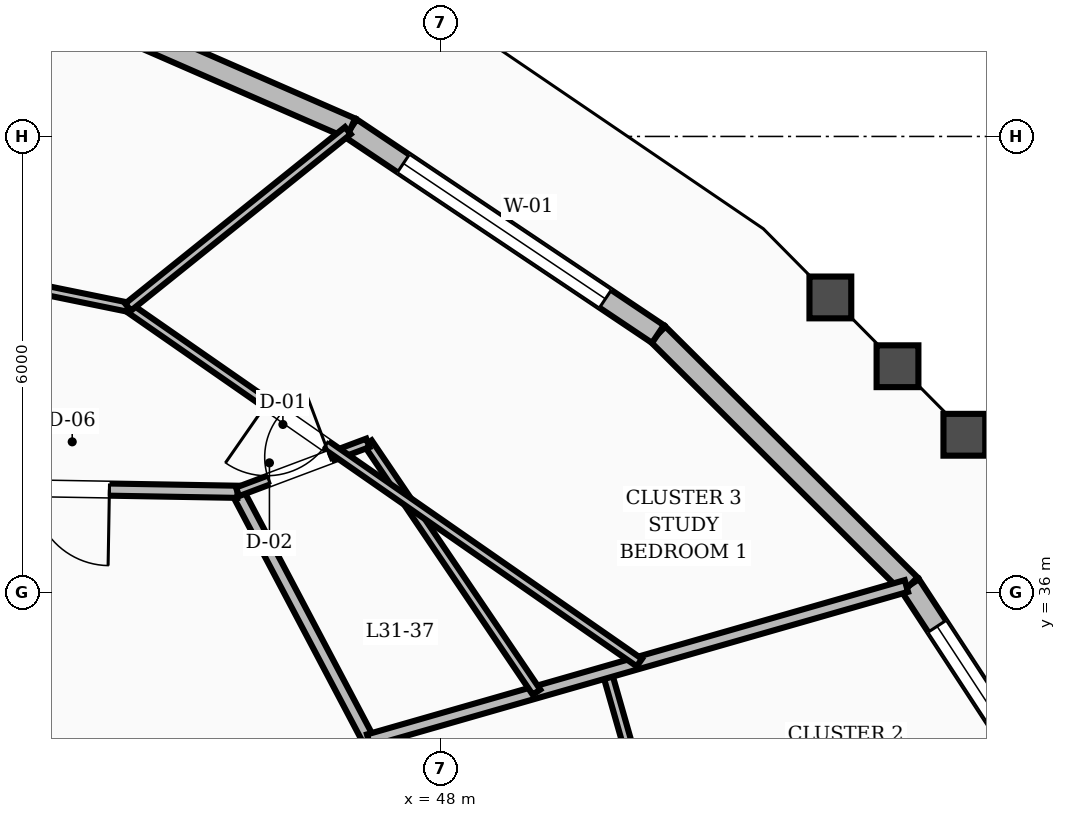
"""IFC4 building model, lengths in metres.
Left out: names, types, materials, properties, quantities, classifications, styles, units other than length and angle.
Written with IfcOpenShell. Run it as: python <this file> out.ifc"""

import sys

from ifc_helpers import new_model, si_unit, direction, frame, frame_2d, origin, place, context, subcontext, project, spatial, rectangle, extrude, element, fill, save


model = new_model("IFC4")
c1 = context("Model", 3, precision=1e-05, world=origin(), true_north=direction((0.0, 1.0)))
c2 = subcontext(c1, "Body", "Model", "MODEL_VIEW")
j1 = project(units=[si_unit("LENGTHUNIT", "METRE"), si_unit("PLANEANGLEUNIT", "RADIAN")], contexts=[c1])
p1 = place(None, origin())
s1 = spatial("IfcSite", under=j1, at=p1, CompositionType="ELEMENT")
p2 = place(p1, origin())
s2 = spatial("IfcBuilding", under=s1, at=p2, CompositionType="ELEMENT")
p3 = place(p2, frame((0.0, 0.0, 124.4)))
s3 = spatial("IfcBuildingStorey", under=s2, at=p3, CompositionType="ELEMENT", Elevation=124.4)
p4 = place(p3, frame((56.637, 32.334, 0.0), z_axis=(0.0, 0.0, 1.0), x_axis=(-0.547581138096, 0.836752590197, 0.0)))
e1 = element("IfcWall", 1, at=p4, inside=s3, PredefinedType="STANDARD", context=c2, shape_type="SweptSolid", body=[
    extrude(rectangle(XDim=4.5, YDim=0.28, at=frame_2d((2.25, 0.0))), origin(), (0.0, 0.0, 1.0), 2.82),
])
p5 = place(p4, frame((0.65, 0.0, 0.8)))
e2 = element("IfcOpeningElement", 2, at=p5, cuts=e1, PredefinedType="OPENING", context=c2, shape_type="SweptSolid", body=[
    extrude(rectangle(XDim=3.2, YDim=1.65, at=frame_2d((1.6, 0.825))), frame((0.0, 0.15, 0.0), z_axis=(0.0, -1.0, 0.0), x_axis=(1.0, 0.0, 0.0)), (0.0, 0.0, 1.0), 0.3),
])
p6 = place(p3, frame((54.173, 36.1, 0.0), z_axis=(0.0, 0.0, 1.0), x_axis=(-0.708826657364, 0.70538271159, 0.0)))
e3 = element("IfcWall", 3, at=p6, inside=s3, PredefinedType="STANDARD", context=c2, shape_type="SweptSolid", body=[
    extrude(rectangle(XDim=4.679, YDim=0.28, at=frame_2d((2.339, 0.0))), origin(), (0.0, 0.0, 1.0), 2.82),
])
p7 = place(p3, frame((50.856, 39.4, 0.0), z_axis=(0.0, 0.0, 1.0), x_axis=(-0.83069663506, 0.556725336679, 0.0)))
e4 = element("IfcWall", 4, at=p7, inside=s3, PredefinedType="STANDARD", context=c2, shape_type="SweptSolid", body=[
    extrude(rectangle(XDim=4.865, YDim=0.28, at=frame_2d((2.432, 0.0))), origin(), (0.0, 0.0, 1.0), 2.82),
])
p8 = place(p7, frame((0.832, 0.0, 0.8)))
e5 = element("IfcOpeningElement", 5, at=p8, cuts=e4, PredefinedType="OPENING", context=c2, shape_type="SweptSolid", body=[
    extrude(rectangle(XDim=3.2, YDim=1.65, at=frame_2d((1.6, 0.825))), frame((0.0, 0.15, 0.0), z_axis=(0.0, -1.0, 0.0), x_axis=(1.0, 0.0, 0.0)), (0.0, 0.0, 1.0), 0.3),
])
p9 = place(p3, frame((46.815, 42.108, 0.0), z_axis=(0.0, 0.0, 1.0), x_axis=(-0.916473381058, 0.400095665825, 0.0)))
e6 = element("IfcWall", 6, at=p9, inside=s3, PredefinedType="STANDARD", context=c2, shape_type="SweptSolid", body=[
    extrude(rectangle(XDim=5.031, YDim=0.28, at=frame_2d((2.515, 0.0))), origin(), (0.0, 0.0, 1.0), 2.82),
])
p10 = place(p3, frame((47.05, 34.056, 0.0), z_axis=(0.0, 0.0, 1.0), x_axis=(-0.466737093093, 0.884396113702, 0.0)))
e7 = element("IfcWall", 7, at=p10, inside=s3, PredefinedType="SOLIDWALL", context=c2, shape_type="SweptSolid", body=[
    extrude(rectangle(XDim=3.696, YDim=0.16, at=frame_2d((1.848, 0.0))), origin(), (0.0, 0.0, 1.0), 2.8),
])
p11 = place(p3, frame((45.325, 37.325, 0.0), z_axis=(0.0, 0.0, 1.0), x_axis=(-0.999853038912, 0.017143528788, 0.0)))
e8 = element("IfcWall", 8, at=p11, inside=s3, PredefinedType="SOLIDWALL", context=c2, shape_type="SweptSolid", body=[
    extrude(rectangle(XDim=4.372, YDim=0.16, at=frame_2d((2.186, 0.0))), origin(), (0.0, 0.0, 1.0), 2.8),
])
p12 = place(p11, frame((1.686, 0.0, 0.0)))
e9 = element("IfcOpeningElement", 9, at=p12, cuts=e8, PredefinedType="OPENING", context=c2, shape_type="SweptSolid", body=[
    extrude(rectangle(XDim=1.0, YDim=2.1, at=frame_2d((0.5, 1.05))), frame((0.0, 0.09, 0.0), z_axis=(0.0, -1.0, 0.0), x_axis=(1.0, 0.0, 0.0)), (0.0, 0.0, 1.0), 0.18),
])
p13 = place(p3, frame((51.268, 31.158, 0.0), z_axis=(0.0, 0.0, 1.0), x_axis=(-0.274582301576, 0.961563601465, 0.0)))
e10 = element("IfcWall", 10, at=p13, inside=s3, PredefinedType="PARTITIONING", context=c2, shape_type="SweptSolid", body=[
    extrude(rectangle(XDim=3.949, YDim=0.12, at=frame_2d((1.974, 0.0))), origin(), (0.0, 0.0, 1.0), 2.8),
])
p14 = place(p13, frame((1.5, 0.0, 0.0)))
e11 = element("IfcOpeningElement", 11, at=p14, cuts=e10, PredefinedType="OPENING", context=c2, shape_type="SweptSolid", body=[
    extrude(rectangle(XDim=0.95, YDim=2.1, at=frame_2d((0.475, 1.05))), frame((0.0, 0.07, 0.0), z_axis=(0.0, -1.0, 0.0), x_axis=(1.0, 0.0, 0.0)), (0.0, 0.0, 1.0), 0.14),
])
p15 = place(p3, frame((47.05, 34.056, 0.0), z_axis=(0.0, 0.0, 1.0), x_axis=(0.96122671613, 0.275759315705, 0.0)))
e12 = element("IfcWall", 12, at=p15, inside=s3, PredefinedType="SOLIDWALL", context=c2, shape_type="SweptSolid", body=[
    extrude(rectangle(XDim=7.36, YDim=0.16, at=frame_2d((3.68, 0.0))), origin(), (0.0, 0.0, 1.0), 2.8),
])
p16 = place(p3, frame((49.258, 34.69, 0.0), z_axis=(0.0, 0.0, 1.0), x_axis=(-0.560422606551, 0.828206799095, 0.0)))
e13 = element("IfcWall", 13, at=p16, inside=s3, PredefinedType="PARTITIONING", context=c2, shape_type="SweptSolid", body=[
    extrude(rectangle(XDim=3.959, YDim=0.12, at=frame_2d((1.979, 0.0))), origin(), (0.0, 0.0, 1.0), 2.8),
])
p17 = place(p3, frame((45.325, 37.325, 0.0), z_axis=(0.0, 0.0, 1.0), x_axis=(0.936268898243, 0.351284144507, 0.0)))
e14 = element("IfcWall", 14, at=p17, inside=s3, PredefinedType="PARTITIONING", context=c2, shape_type="SweptSolid", body=[
    extrude(rectangle(XDim=1.831, YDim=0.12, at=frame_2d((0.916, 0.0))), origin(), (0.0, 0.0, 1.0), 2.8),
])
p18 = place(p17, frame((0.44, 0.0, 0.0)))
e15 = element("IfcOpeningElement", 15, at=p18, cuts=e14, PredefinedType="OPENING", context=c2, shape_type="SweptSolid", body=[
    extrude(rectangle(XDim=0.86, YDim=2.1, at=frame_2d((0.43, 1.05))), frame((0.0, 0.07, 0.0), z_axis=(0.0, -1.0, 0.0), x_axis=(1.0, 0.0, 0.0)), (0.0, 0.0, 1.0), 0.14),
])
p19 = place(p3, frame((50.611, 35.078, 0.0), z_axis=(0.0, 0.0, 1.0), x_axis=(-0.821081312211, 0.570811246156, 0.0)))
e16 = element("IfcWall", 16, at=p19, inside=s3, PredefinedType="PARTITIONING", context=c2, shape_type="SweptSolid", body=[
    extrude(rectangle(XDim=8.192, YDim=0.12, at=frame_2d((4.096, 0.0))), origin(), (0.0, 0.0, 1.0), 2.8),
])
p20 = place(p19, frame((5.021, 0.0, 0.0)))
e17 = element("IfcOpeningElement", 17, at=p20, cuts=e16, PredefinedType="OPENING", context=c2, shape_type="SweptSolid", body=[
    extrude(rectangle(XDim=0.95, YDim=2.1, at=frame_2d((0.475, 1.05))), frame((0.0, 0.07, 0.0), z_axis=(0.0, -1.0, 0.0), x_axis=(1.0, 0.0, 0.0)), (0.0, 0.0, 1.0), 0.14),
])
p21 = place(p3, frame((43.885, 39.754, 0.0), z_axis=(0.0, 0.0, 1.0), x_axis=(-0.979728085565, 0.200331920462, 0.0)))
e18 = element("IfcWall", 18, at=p21, inside=s3, PredefinedType="PARTITIONING", context=c2, shape_type="SweptSolid", body=[
    extrude(rectangle(XDim=8.115, YDim=0.12, at=frame_2d((4.058, 0.0))), origin(), (0.0, 0.0, 1.0), 2.8),
])
p22 = place(p21, frame((3.583, 0.0, 0.0)))
e19 = element("IfcOpeningElement", 19, at=p22, cuts=e18, PredefinedType="OPENING", context=c2, shape_type="SweptSolid", body=[
    extrude(rectangle(XDim=0.95, YDim=2.1, at=frame_2d((0.475, 1.05))), frame((0.0, 0.07, 0.0), z_axis=(0.0, -1.0, 0.0), x_axis=(1.0, 0.0, 0.0)), (0.0, 0.0, 1.0), 0.14),
])
p23 = place(p3, frame((43.885, 39.754, 0.0), z_axis=(0.0, 0.0, 1.0), x_axis=(0.779621413821, 0.626251108671, 0.0)))
e20 = element("IfcWall", 20, at=p23, inside=s3, PredefinedType="PARTITIONING", context=c2, shape_type="SweptSolid", body=[
    extrude(rectangle(XDim=3.709, YDim=0.12, at=frame_2d((1.854, 0.0))), origin(), (0.0, 0.0, 1.0), 2.8),
])
p24 = place(p5, origin())
e21 = element("IfcWindow", 21, at=p24, inside=s3, PartitioningType="SINGLE_PANEL", PredefinedType="WINDOW", context=c2, shape_type="SweptSolid", body=[
    extrude(rectangle(XDim=3.2, YDim=1.65, at=frame_2d((1.6, 0.825))), frame((0.0, 0.03, 0.0), z_axis=(0.0, -1.0, 0.0), x_axis=(1.0, 0.0, 0.0)), (0.0, 0.0, 1.0), 0.06),
])
fill(e2, e21)
p25 = place(p8, origin())
e22 = element("IfcWindow", 22, at=p25, inside=s3, PartitioningType="SINGLE_PANEL", PredefinedType="WINDOW", context=c2, shape_type="SweptSolid", body=[
    extrude(rectangle(XDim=3.2, YDim=1.65, at=frame_2d((1.6, 0.825))), frame((0.0, 0.03, 0.0), z_axis=(0.0, -1.0, 0.0), x_axis=(1.0, 0.0, 0.0)), (0.0, 0.0, 1.0), 0.06),
])
fill(e5, e22)
p26 = place(p18, origin())
e23 = element("IfcDoor", 23, at=p26, inside=s3, OperationType="SINGLE_SWING_RIGHT", PredefinedType="DOOR", context=c2, shape_type="SweptSolid", body=[
    extrude(rectangle(XDim=0.86, YDim=2.1, at=frame_2d((0.43, 1.05))), frame((0.0, 0.025, 0.0), z_axis=(0.0, -1.0, 0.0), x_axis=(1.0, 0.0, 0.0)), (0.0, 0.0, 1.0), 0.05),
])
fill(e15, e23)
p27 = place(p12, origin())
e24 = element("IfcDoor", 24, at=p27, inside=s3, OperationType="SINGLE_SWING_LEFT", PredefinedType="DOOR", context=c2, shape_type="SweptSolid", body=[
    extrude(rectangle(XDim=1.0, YDim=2.1, at=frame_2d((0.5, 1.05))), frame((0.0, 0.025, 0.0), z_axis=(0.0, -1.0, 0.0), x_axis=(1.0, 0.0, 0.0)), (0.0, 0.0, 1.0), 0.05),
])
fill(e9, e24)
p28 = place(p20, origin())
e25 = element("IfcDoor", 25, at=p28, inside=s3, OperationType="SINGLE_SWING_RIGHT", PredefinedType="DOOR", context=c2, shape_type="SweptSolid", body=[
    extrude(rectangle(XDim=0.95, YDim=2.1, at=frame_2d((0.475, 1.05))), frame((0.0, 0.025, 0.0), z_axis=(0.0, -1.0, 0.0), x_axis=(1.0, 0.0, 0.0)), (0.0, 0.0, 1.0), 0.05),
])
fill(e17, e25)
save(model, sys.argv[1])
